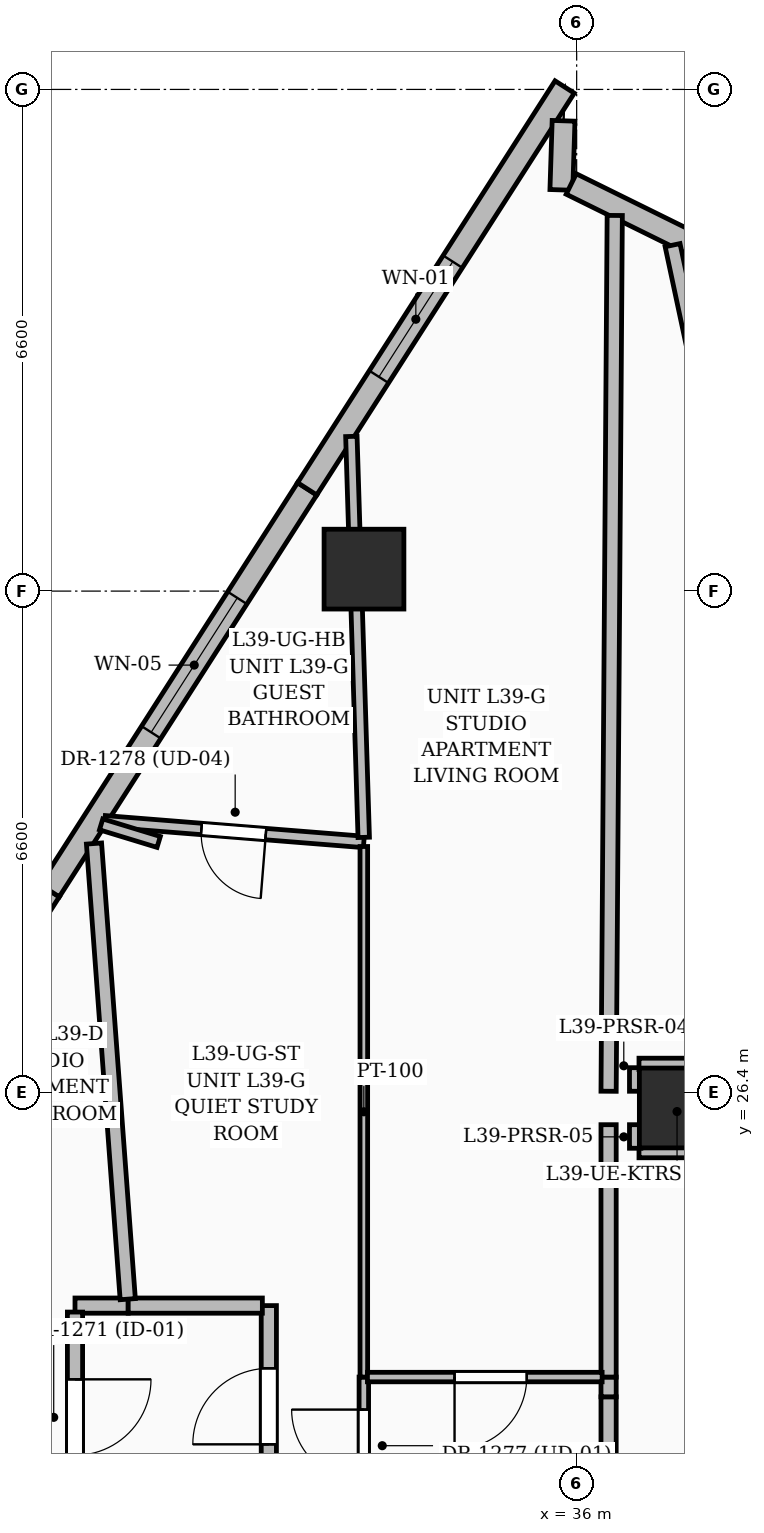
"""IFC4 building model, lengths in metres.
Left out: names, types, materials, properties, quantities, classifications, styles, units other than length and angle.
Written with IfcOpenShell. Run it as: python <this file> out.ifc"""

import sys

from ifc_helpers import new_model, si_unit, direction, frame, frame_2d, origin, origin_2d, place, context, subcontext, project, spatial, rectangle, extrude, element, fill, save


model = new_model("IFC4")
c1 = context("Model", 3, precision=1e-05, world=origin(), true_north=direction((0.0, 1.0)))
c2 = subcontext(c1, "Body", "Model", "MODEL_VIEW")
j1 = project(units=[si_unit("LENGTHUNIT", "METRE"), si_unit("PLANEANGLEUNIT", "RADIAN")], contexts=[c1])
p1 = place(None, origin())
s1 = spatial("IfcSite", under=j1, at=p1, CompositionType="ELEMENT")
p2 = place(p1, origin())
s2 = spatial("IfcBuilding", under=s1, at=p2, CompositionType="ELEMENT")
p3 = place(p2, frame((0.0, 0.0, 153.6)))
s3 = spatial("IfcBuildingStorey", under=s2, at=p3, CompositionType="ELEMENT", Elevation=153.6)
for number, where, z_axis, x_axis in (
    (1, (37.35, 26.2, 0.0), (0.0, 0.0, 1.0), (1.0, 0.0, 0.0)),
    (2, (33.202, 33.289, 0.0), (0.0, 0.0, 1.0), (1.0, 0.0, 0.0)),
):
    element("IfcColumn", number, at=place(p3, frame(where, z_axis=z_axis, x_axis=x_axis)), inside=s3, PredefinedType="COLUMN", context=c2, shape_type="SweptSolid", body=[
        extrude(rectangle(XDim=1.05, YDim=1.05, at=origin_2d()), origin(), (0.0, 0.0, 1.0), 3.6),
    ])
p4 = place(p3, frame((25.679, 23.772, 0.0), z_axis=(0.0, 0.0, 1.0), x_axis=(0.539489448276, 0.841992360535, 0.0)))
e3 = element("IfcWall", 3, at=p4, inside=s3, PredefinedType="SOLIDWALL", context=c2, shape_type="SweptSolid", body=[
    extrude(rectangle(XDim=6.279, YDim=0.3, at=frame_2d((3.14, 0.0))), origin(), (0.0, 0.0, 1.0), 3.35),
])
p5 = place(p4, frame((1.825, 0.0, 0.6)))
e4 = element("IfcOpeningElement", 4, at=p5, cuts=e3, PredefinedType="OPENING", context=c2, shape_type="SweptSolid", body=[
    extrude(rectangle(XDim=2.4, YDim=2.1, at=frame_2d((1.2, 1.05))), frame((0.0, 0.16, 0.0), z_axis=(0.0, -1.0, 0.0), x_axis=(1.0, 0.0, 0.0)), (0.0, 0.0, 1.0), 0.32),
])
p6 = place(p3, frame((29.067, 29.059, 0.0), z_axis=(0.0, 0.0, 1.0), x_axis=(0.539534675603, 0.841963380333, 0.0)))
e5 = element("IfcWall", 5, at=p6, inside=s3, PredefinedType="SOLIDWALL", context=c2, shape_type="SweptSolid", body=[
    extrude(rectangle(XDim=6.279, YDim=0.3, at=frame_2d((3.139, 0.0))), origin(), (0.0, 0.0, 1.0), 3.35),
])
p7 = place(p6, frame((2.475, 0.0, 0.55)))
e6 = element("IfcOpeningElement", 6, at=p7, cuts=e5, PredefinedType="OPENING", context=c2, shape_type="SweptSolid", body=[
    extrude(rectangle(XDim=2.1, YDim=2.4, at=frame_2d((1.05, 1.2))), frame((0.0, 0.16, 0.0), z_axis=(0.0, -1.0, 0.0), x_axis=(1.0, 0.0, 0.0)), (0.0, 0.0, 1.0), 0.32),
])
p8 = place(p3, frame((32.455, 34.345, 0.0), z_axis=(0.0, 0.0, 1.0), x_axis=(0.539489448276, 0.841992360535, 0.0)))
e7 = element("IfcWall", 7, at=p8, inside=s3, PredefinedType="SOLIDWALL", context=c2, shape_type="SweptSolid", body=[
    extrude(rectangle(XDim=6.279, YDim=0.3, at=frame_2d((3.14, 0.0))), origin(), (0.0, 0.0, 1.0), 3.35),
])
p9 = place(p8, frame((1.75, 0.0, 0.6)))
e8 = element("IfcOpeningElement", 8, at=p9, cuts=e7, PredefinedType="OPENING", context=c2, shape_type="SweptSolid", body=[
    extrude(rectangle(XDim=1.8, YDim=2.1, at=frame_2d((0.9, 1.05))), frame((0.0, 0.16, 0.0), z_axis=(0.0, -1.0, 0.0), x_axis=(1.0, 0.0, 0.0)), (0.0, 0.0, 1.0), 0.32),
])
p10 = place(p3, frame((35.828, 39.187, 0.0), z_axis=(0.0, 0.0, 1.0), x_axis=(-0.031938584897, -0.999489833262, 0.0)))
e9 = element("IfcWall", 9, at=p10, inside=s3, PredefinedType="SOLIDWALL", context=c2, shape_type="SweptSolid", body=[
    extrude(rectangle(XDim=0.91, YDim=0.3, at=frame_2d((0.455, 0.0))), origin(), (0.0, 0.0, 1.0), 3.35),
])
p11 = place(p3, frame((35.928, 38.356, 0.0), z_axis=(0.0, 0.0, 1.0), x_axis=(0.896845505116, -0.442343915922, 0.0)))
e10 = element("IfcWall", 10, at=p11, inside=s3, PredefinedType="SOLIDWALL", context=c2, shape_type="SweptSolid", body=[
    extrude(rectangle(XDim=2.249, YDim=0.3, at=frame_2d((1.125, 0.0))), origin(), (0.0, 0.0, 1.0), 3.35),
])
p12 = place(p3, frame((30.1, 23.6, 0.0), z_axis=(0.0, 0.0, 1.0), x_axis=(-1.0, 0.0, 0.0)))
e11 = element("IfcWall", 11, at=p12, inside=s3, PredefinedType="PARTITIONING", context=c2, shape_type="SweptSolid", body=[
    extrude(rectangle(XDim=0.7, YDim=0.2, at=frame_2d((0.35, 0.0))), origin(), (0.0, 0.0, 1.0), 2.393),
])
p13 = place(p3, frame((29.4, 23.515, 0.0), z_axis=(0.0, 0.0, 1.0), x_axis=(0.0, -1.0, 0.0)))
e12 = element("IfcWall", 12, at=p13, inside=s3, PredefinedType="PARTITIONING", context=c2, shape_type="SweptSolid", body=[
    extrude(rectangle(XDim=2.855, YDim=0.2, at=frame_2d((1.427, 0.0))), origin(), (0.0, 0.0, 1.0), 2.393),
])
p14 = place(p13, frame((0.885, 0.0, 0.0)))
e13 = element("IfcOpeningElement", 13, at=p14, cuts=e12, PredefinedType="OPENING", context=c2, shape_type="SweptSolid", body=[
    extrude(rectangle(XDim=1.0, YDim=2.2, at=frame_2d((0.5, 1.1))), frame((0.0, 0.11, 0.0), z_axis=(0.0, -1.0, 0.0), x_axis=(1.0, 0.0, 0.0)), (0.0, 0.0, 1.0), 0.22),
])
p15 = place(p3, frame((31.95, 20.95, 0.0), z_axis=(0.0, 0.0, 1.0), x_axis=(0.0, 1.0, 0.0)))
e14 = element("IfcWall", 14, at=p15, inside=s3, PredefinedType="PARTITIONING", context=c2, shape_type="SweptSolid", body=[
    extrude(rectangle(XDim=2.65, YDim=0.2, at=frame_2d((1.325, 0.0))), origin(), (0.0, 0.0, 1.0), 2.393),
])
p16 = place(p15, frame((0.825, 0.0, 0.0)))
e15 = element("IfcOpeningElement", 15, at=p16, cuts=e14, PredefinedType="OPENING", context=c2, shape_type="SweptSolid", body=[
    extrude(rectangle(XDim=1.0, YDim=2.2, at=frame_2d((0.5, 1.1))), frame((0.0, 0.11, 0.0), z_axis=(0.0, -1.0, 0.0), x_axis=(1.0, 0.0, 0.0)), (0.0, 0.0, 1.0), 0.22),
])
p17 = place(p3, frame((31.865, 23.6, 0.0), z_axis=(0.0, 0.0, 1.0), x_axis=(-1.0, 0.0, 0.0)))
e16 = element("IfcWall", 16, at=p17, inside=s3, PredefinedType="PARTITIONING", context=c2, shape_type="SweptSolid", body=[
    extrude(rectangle(XDim=1.765, YDim=0.2, at=frame_2d((0.882, 0.0))), origin(), (0.0, 0.0, 1.0), 2.911),
])
p18 = place(p3, frame((30.094, 23.685, 0.0), z_axis=(0.0, 0.0, 1.0), x_axis=(-0.073885151141, 0.997266756912, 0.0)))
e17 = element("IfcWall", 17, at=p18, inside=s3, PredefinedType="PARTITIONING", context=c2, shape_type="SweptSolid", body=[
    extrude(rectangle(XDim=6.01, YDim=0.2, at=frame_2d((3.005, 0.0))), origin(), (0.0, 0.0, 1.0), 2.57),
])
p19 = place(p3, frame((36.42, 22.4, 0.0), z_axis=(0.0, 0.0, 1.0), x_axis=(0.0, -1.0, 0.0)))
e18 = element("IfcWall", 18, at=p19, inside=s3, PredefinedType="PARTITIONING", context=c2, shape_type="SweptSolid", body=[
    extrude(rectangle(XDim=4.565, YDim=0.2, at=frame_2d((2.282, 0.0))), origin(), (0.0, 0.0, 1.0), 3.35),
])
p20 = place(p3, frame((36.42, 22.66, 0.0), z_axis=(0.0, 0.0, 1.0), x_axis=(0.0, -1.0, 0.0)))
e19 = element("IfcWall", 19, at=p20, inside=s3, PredefinedType="PARTITIONING", context=c2, shape_type="SweptSolid", body=[
    extrude(rectangle(XDim=0.26, YDim=0.2, at=frame_2d((0.13, 0.0))), origin(), (0.0, 0.0, 1.0), 3.35),
])
p21 = place(p3, frame((36.42, 25.98, 0.0), z_axis=(0.0, 0.0, 1.0), x_axis=(0.0, -1.0, 0.0)))
e20 = element("IfcWall", 20, at=p21, inside=s3, PredefinedType="PARTITIONING", context=c2, shape_type="SweptSolid", body=[
    extrude(rectangle(XDim=3.32, YDim=0.2, at=frame_2d((1.66, 0.0))), origin(), (0.0, 0.0, 1.0), 2.436),
])
p22 = place(p3, frame((36.501, 37.942, 0.0), z_axis=(0.0, 0.0, 1.0), x_axis=(-0.007034618495, -0.999975256765, 0.0)))
e21 = element("IfcWall", 21, at=p22, inside=s3, PredefinedType="PARTITIONING", context=c2, shape_type="SweptSolid", body=[
    extrude(rectangle(XDim=11.522, YDim=0.2, at=frame_2d((5.761, 0.0))), origin(), (0.0, 0.0, 1.0), 2.393),
])
p23 = place(p3, frame((38.83, 30.21, 0.0), z_axis=(0.0, 0.0, 1.0), x_axis=(-0.208896033751, 0.977937854407, 0.0)))
e22 = element("IfcWall", 22, at=p23, inside=s3, PredefinedType="PARTITIONING", context=c2, shape_type="SweptSolid", body=[
    extrude(rectangle(XDim=7.507, YDim=0.2, at=frame_2d((3.753, 0.0))), origin(), (0.0, 0.0, 1.0), 2.57),
])
p24 = place(p3, frame((33.2, 29.7, 0.0), z_axis=(0.0, 0.0, 1.0), x_axis=(-0.996817095408, 0.079722508132, 0.0)))
e23 = element("IfcWall", 23, at=p24, inside=s3, PredefinedType="PARTITIONING", context=c2, shape_type="SweptSolid", body=[
    extrude(rectangle(XDim=3.418, YDim=0.15, at=frame_2d((1.709, 0.0))), origin(), (0.0, 0.0, 1.0), 2.57),
])
p25 = place(p24, frame((1.293, 0.0, 0.0)))
e24 = element("IfcOpeningElement", 24, at=p25, cuts=e23, PredefinedType="OPENING", context=c2, shape_type="SweptSolid", body=[
    extrude(rectangle(XDim=0.85, YDim=2.1, at=frame_2d((0.425, 1.05))), frame((0.0, 0.085, 0.0), z_axis=(0.0, -1.0, 0.0), x_axis=(1.0, 0.0, 0.0)), (0.0, 0.0, 1.0), 0.17),
])
p26 = place(p3, frame((33.2, 20.998, 0.0), z_axis=(0.0, 0.0, 1.0), x_axis=(0.0, 1.0, 0.0)))
e25 = element("IfcWall", 25, at=p26, inside=s3, PredefinedType="PARTITIONING", context=c2, shape_type="SweptSolid", body=[
    extrude(rectangle(XDim=1.662, YDim=0.125, at=frame_2d((0.831, 0.0))), origin(), (0.0, 0.0, 1.0), 3.35),
])
p27 = place(p26, frame((0.284, 0.0, 0.0)))
e26 = element("IfcOpeningElement", 26, at=p27, cuts=e25, PredefinedType="OPENING", context=c2, shape_type="SweptSolid", body=[
    extrude(rectangle(XDim=0.95, YDim=2.2, at=frame_2d((0.475, 1.1))), frame((0.0, 0.072, 0.0), z_axis=(0.0, -1.0, 0.0), x_axis=(1.0, 0.0, 0.0)), (0.0, 0.0, 1.0), 0.145),
])
p28 = place(p3, frame((33.2, 22.66, 0.0), z_axis=(0.0, 0.0, 1.0), x_axis=(0.0, 1.0, 0.0)))
e27 = element("IfcWall", 27, at=p28, inside=s3, PredefinedType="PARTITIONING", context=c2, shape_type="SweptSolid", body=[
    extrude(rectangle(XDim=6.98, YDim=0.1, at=frame_2d((3.49, 0.0))), origin(), (0.0, 0.0, 1.0), 2.911),
])
p29 = place(p3, frame((33.199, 29.76, 0.0), z_axis=(0.0, 0.0, 1.0), x_axis=(-0.030856354446, 0.999523829326, 0.0)))
e28 = element("IfcWall", 28, at=p29, inside=s3, PredefinedType="PARTITIONING", context=c2, shape_type="SweptSolid", body=[
    extrude(rectangle(XDim=5.277, YDim=0.15, at=frame_2d((2.639, 0.0))), origin(), (0.0, 0.0, 1.0), 2.57),
])
p30 = place(p3, frame((36.335, 22.66, 0.0), z_axis=(0.0, 0.0, 1.0), x_axis=(-1.0, 0.0, 0.0)))
e29 = element("IfcWall", 29, at=p30, inside=s3, PredefinedType="PARTITIONING", context=c2, shape_type="SweptSolid", body=[
    extrude(rectangle(XDim=3.087, YDim=0.125, at=frame_2d((1.544, 0.0))), origin(), (0.0, 0.0, 1.0), 2.436),
])
p31 = place(p30, frame((0.991, 0.0, 0.0)))
e30 = element("IfcOpeningElement", 30, at=p31, cuts=e29, PredefinedType="OPENING", context=c2, shape_type="SweptSolid", body=[
    extrude(rectangle(XDim=0.95, YDim=2.2, at=frame_2d((0.475, 1.1))), frame((0.0, 0.072, 0.0), z_axis=(0.0, -1.0, 0.0), x_axis=(1.0, 0.0, 0.0)), (0.0, 0.0, 1.0), 0.145),
])
p32 = place(p3, frame((29.744, 29.931, 0.0), z_axis=(0.0, 0.0, 1.0), x_axis=(0.956483166449, -0.291787512241, 0.0)))
e31 = element("IfcWall", 31, at=p32, inside=s3, PredefinedType="PARTITIONING", context=c2, shape_type="SweptSolid", body=[
    extrude(rectangle(XDim=0.792, YDim=0.15, at=frame_2d((0.396, 0.0))), origin(), (0.0, 0.0, 1.0), 3.35),
])
p33 = place(p3, frame((36.77, 26.42, 0.0), z_axis=(0.0, 0.0, 1.0), x_axis=(0.0, 1.0, 0.0)))
e32 = element("IfcWall", 32, at=p33, inside=s3, PredefinedType="PARTITIONING", context=c2, shape_type="SweptSolid", body=[
    extrude(rectangle(XDim=0.31, YDim=0.15, at=frame_2d((0.155, 0.0))), origin(), (0.0, 0.0, 1.0), 2.393),
])
p34 = place(p3, frame((36.82, 26.78, 0.0), z_axis=(0.0, 0.0, 1.0), x_axis=(1.0, 0.0, 0.0)))
e33 = element("IfcWall", 33, at=p34, inside=s3, PredefinedType="PARTITIONING", context=c2, shape_type="SweptSolid", body=[
    extrude(rectangle(XDim=1.07, YDim=0.15, at=frame_2d((0.535, 0.0))), origin(), (0.0, 0.0, 1.0), 2.393),
])
p35 = place(p3, frame((37.89, 25.62, 0.0), z_axis=(0.0, 0.0, 1.0), x_axis=(-1.0, 0.0, 0.0)))
e34 = element("IfcWall", 34, at=p35, inside=s3, PredefinedType="PARTITIONING", context=c2, shape_type="SweptSolid", body=[
    extrude(rectangle(XDim=1.07, YDim=0.15, at=frame_2d((0.535, 0.0))), origin(), (0.0, 0.0, 1.0), 2.436),
])
p36 = place(p3, frame((36.77, 25.67, 0.0), z_axis=(0.0, 0.0, 1.0), x_axis=(0.0, 1.0, 0.0)))
e35 = element("IfcWall", 35, at=p36, inside=s3, PredefinedType="PARTITIONING", context=c2, shape_type="SweptSolid", body=[
    extrude(rectangle(XDim=0.31, YDim=0.15, at=frame_2d((0.155, 0.0))), origin(), (0.0, 0.0, 1.0), 3.35),
])
p37 = place(p7, origin())
e36 = element("IfcWindow", 36, at=p37, inside=s3, PartitioningType="SINGLE_PANEL", PredefinedType="WINDOW", context=c2, shape_type="SweptSolid", body=[
    extrude(rectangle(XDim=2.1, YDim=2.4, at=frame_2d((1.05, 1.2))), frame((0.0, 0.03, 0.0), z_axis=(0.0, -1.0, 0.0), x_axis=(1.0, 0.0, 0.0)), (0.0, 0.0, 1.0), 0.06),
])
fill(e6, e36)
p38 = place(p9, origin())
e37 = element("IfcWindow", 37, at=p38, inside=s3, PartitioningType="SINGLE_PANEL", PredefinedType="WINDOW", context=c2, shape_type="SweptSolid", body=[
    extrude(rectangle(XDim=1.8, YDim=2.1, at=frame_2d((0.9, 1.05))), frame((0.0, 0.03, 0.0), z_axis=(0.0, -1.0, 0.0), x_axis=(1.0, 0.0, 0.0)), (0.0, 0.0, 1.0), 0.06),
])
fill(e8, e37)
p39 = place(p14, origin())
e38 = element("IfcDoor", 38, at=p39, inside=s3, OperationType="SINGLE_SWING_LEFT", PredefinedType="DOOR", context=c2, shape_type="SweptSolid", body=[
    extrude(rectangle(XDim=1.0, YDim=2.2, at=frame_2d((0.5, 1.1))), frame((0.0, 0.025, 0.0), z_axis=(0.0, -1.0, 0.0), x_axis=(1.0, 0.0, 0.0)), (0.0, 0.0, 1.0), 0.05),
])
fill(e13, e38)
p40 = place(p16, origin())
e39 = element("IfcDoor", 39, at=p40, inside=s3, OperationType="SINGLE_SWING_LEFT", PredefinedType="DOOR", context=c2, shape_type="SweptSolid", body=[
    extrude(rectangle(XDim=1.0, YDim=2.2, at=frame_2d((0.5, 1.1))), frame((0.0, 0.025, 0.0), z_axis=(0.0, -1.0, 0.0), x_axis=(1.0, 0.0, 0.0)), (0.0, 0.0, 1.0), 0.05),
])
fill(e15, e39)
p41 = place(p27, origin())
e40 = element("IfcDoor", 40, at=p41, inside=s3, OperationType="SINGLE_SWING_RIGHT", PredefinedType="DOOR", context=c2, shape_type="SweptSolid", body=[
    extrude(rectangle(XDim=0.95, YDim=2.2, at=frame_2d((0.475, 1.1))), frame((0.0, 0.025, 0.0), z_axis=(0.0, -1.0, 0.0), x_axis=(1.0, 0.0, 0.0)), (0.0, 0.0, 1.0), 0.05),
])
fill(e26, e40)
p42 = place(p25, origin())
e41 = element("IfcDoor", 41, at=p42, inside=s3, OperationType="SINGLE_SWING_LEFT", PredefinedType="DOOR", context=c2, shape_type="SweptSolid", body=[
    extrude(rectangle(XDim=0.85, YDim=2.1, at=frame_2d((0.425, 1.05))), frame((0.0, 0.025, 0.0), z_axis=(0.0, -1.0, 0.0), x_axis=(1.0, 0.0, 0.0)), (0.0, 0.0, 1.0), 0.05),
])
fill(e24, e41)
p43 = place(p31, origin())
e42 = element("IfcDoor", 42, at=p43, inside=s3, OperationType="SINGLE_SWING_RIGHT", PredefinedType="DOOR", context=c2, shape_type="SweptSolid", body=[
    extrude(rectangle(XDim=0.95, YDim=2.2, at=frame_2d((0.475, 1.1))), frame((0.0, 0.025, 0.0), z_axis=(0.0, -1.0, 0.0), x_axis=(1.0, 0.0, 0.0)), (0.0, 0.0, 1.0), 0.05),
])
fill(e30, e42)
save(model, sys.argv[1])
